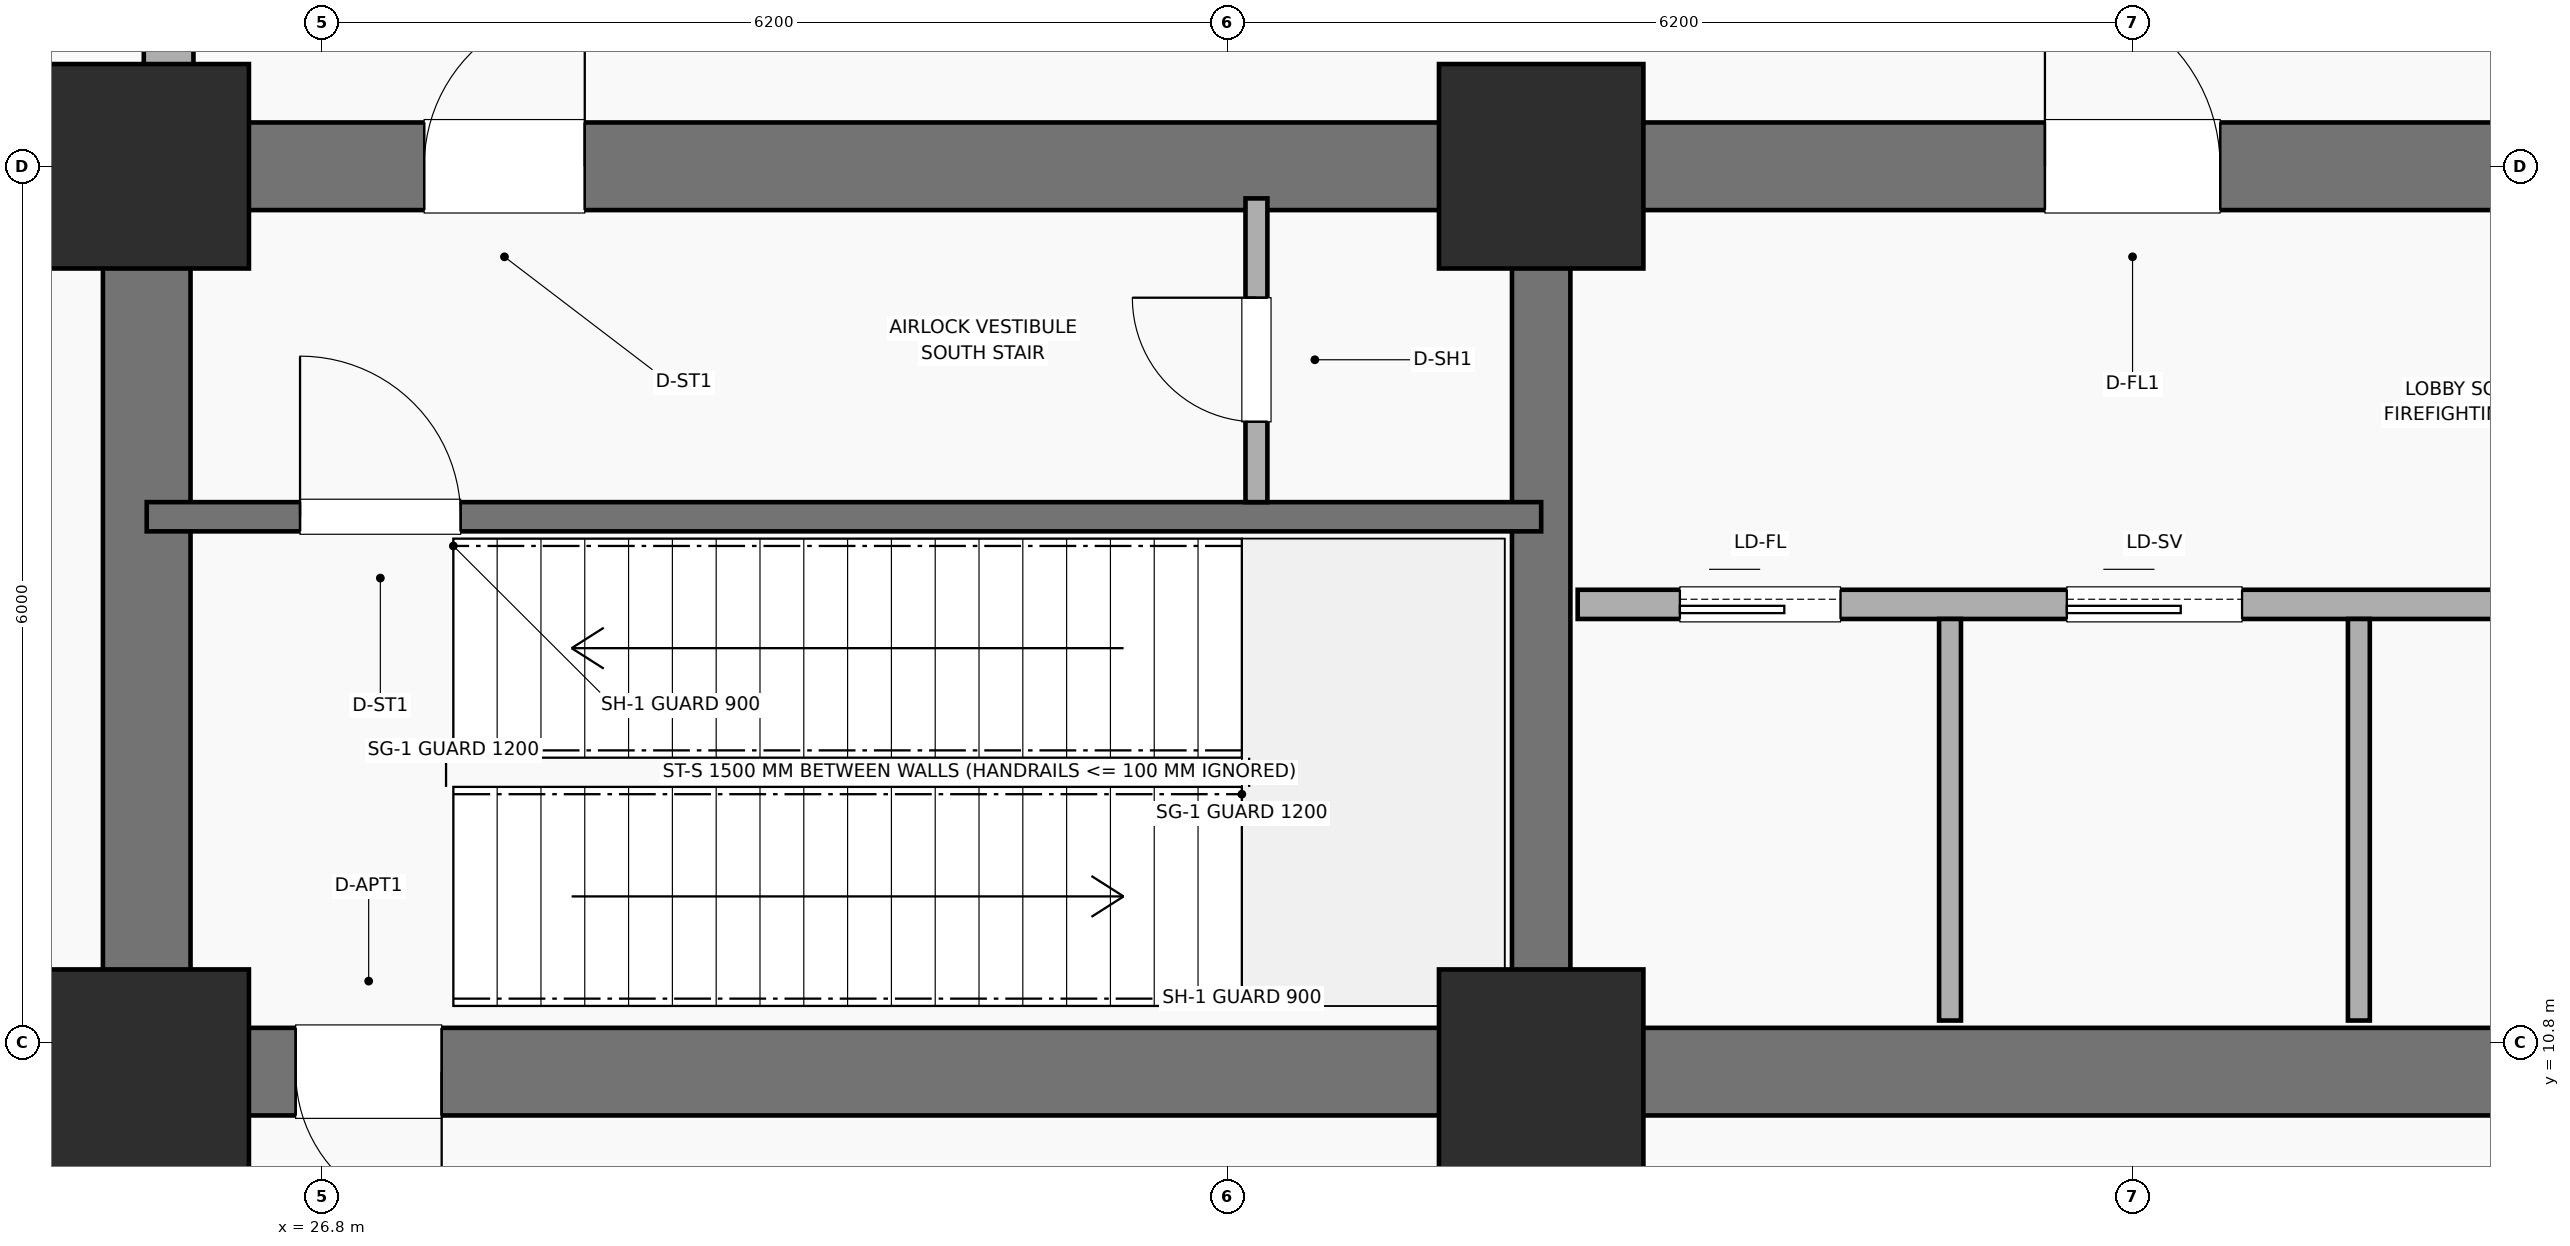
"""IFC4 building model, lengths in metres.
Left out: names, types, materials, properties, quantities, classifications, styles, units other than length and angle.
Written with IfcOpenShell. Run it as: python <this file> out.ifc"""

import sys

from ifc_helpers import new_model, si_unit, direction, frame, frame_2d, origin, origin_2d, place, context, subcontext, project, spatial, rectangle, extrude, element, fill, save


model = new_model("IFC4")
c1 = context("Model", 3, precision=1e-05, world=origin(), true_north=direction((0.0, 1.0)))
c2 = subcontext(c1, "Body", "Model", "MODEL_VIEW")
j1 = project(units=[si_unit("LENGTHUNIT", "METRE"), si_unit("PLANEANGLEUNIT", "RADIAN")], contexts=[c1])
p1 = place(None, origin())
s1 = spatial("IfcSite", under=j1, at=p1, CompositionType="ELEMENT")
p2 = place(p1, origin())
s2 = spatial("IfcBuilding", under=s1, at=p2, CompositionType="ELEMENT")
p3 = place(p2, origin())
s3 = spatial("IfcBuildingStorey", under=s2, at=p3, CompositionType="ELEMENT", Elevation=0.0)
p4 = place(p3, frame((52.8, 10.6, 0.0), z_axis=(0.0, 0.0, 1.0), x_axis=(-1.0, 0.0, 0.0)))
e1 = element("IfcWall", 1, at=p4, inside=s3, PredefinedType="SHEAR", context=c2, shape_type="SweptSolid", body=[
    extrude(rectangle(XDim=27.2, YDim=0.6, at=frame_2d((13.6, 0.0))), origin(), (0.0, 0.0, 1.0), 6.6),
])
p5 = place(p4, frame((25.18, 0.0, 0.0)))
e2 = element("IfcOpeningElement", 2, at=p5, cuts=e1, PredefinedType="OPENING", context=c2, shape_type="SweptSolid", body=[
    extrude(rectangle(XDim=1.0, YDim=2.15, at=frame_2d((0.5, 1.075))), frame((0.0, 0.31, 0.0), z_axis=(0.0, -1.0, 0.0), x_axis=(1.0, 0.0, 0.0)), (0.0, 0.0, 1.0), 0.62),
])
p6 = place(p3, frame((25.6, 10.9, 0.0), z_axis=(0.0, 0.0, 1.0), x_axis=(0.0, 1.0, 0.0)))
e3 = element("IfcWall", 3, at=p6, inside=s3, PredefinedType="SHEAR", context=c2, shape_type="SweptSolid", body=[
    extrude(rectangle(XDim=5.6, YDim=0.6, at=frame_2d((2.8, 0.0))), origin(), (0.0, 0.0, 1.0), 6.6),
])
p7 = place(p3, frame((25.6, 16.8, 0.0), z_axis=(0.0, 0.0, 1.0), x_axis=(1.0, 0.0, 0.0)))
e4 = element("IfcWall", 4, at=p7, inside=s3, PredefinedType="SHEAR", context=c2, shape_type="SweptSolid", body=[
    extrude(rectangle(XDim=27.2, YDim=0.6, at=frame_2d((13.6, 0.0))), origin(), (0.0, 0.0, 1.0), 6.6),
])
p8 = place(p7, frame((1.9, 0.0, 0.0)))
e5 = element("IfcOpeningElement", 5, at=p8, cuts=e4, PredefinedType="OPENING", context=c2, shape_type="SweptSolid", body=[
    extrude(rectangle(XDim=1.1, YDim=2.15, at=frame_2d((0.55, 1.075))), frame((0.0, 0.31, 0.0), z_axis=(0.0, -1.0, 0.0), x_axis=(1.0, 0.0, 0.0)), (0.0, 0.0, 1.0), 0.62),
])
p9 = place(p7, frame((13.0, 0.0, 0.0)))
e6 = element("IfcOpeningElement", 6, at=p9, cuts=e4, PredefinedType="OPENING", context=c2, shape_type="SweptSolid", body=[
    extrude(rectangle(XDim=1.2, YDim=2.15, at=frame_2d((0.6, 1.075))), frame((0.0, 0.31, 0.0), z_axis=(0.0, -1.0, 0.0), x_axis=(1.0, 0.0, 0.0)), (0.0, 0.0, 1.0), 0.62),
])
p10 = place(p7, frame((20.4, 0.0, 0.0)))
e7 = element("IfcOpeningElement", 7, at=p10, cuts=e4, PredefinedType="OPENING", context=c2, shape_type="SweptSolid", body=[
    extrude(rectangle(XDim=1.3, YDim=2.2, at=frame_2d((0.65, 1.1))), frame((0.0, 0.31, 0.0), z_axis=(0.0, -1.0, 0.0), x_axis=(1.0, 0.0, 0.0)), (0.0, 0.0, 1.0), 0.62),
])
p11 = place(p7, frame((24.65, 0.0, 0.0)))
e8 = element("IfcOpeningElement", 8, at=p11, cuts=e4, PredefinedType="OPENING", context=c2, shape_type="SweptSolid", body=[
    extrude(rectangle(XDim=0.85, YDim=2.1, at=frame_2d((0.425, 1.05))), frame((0.0, 0.31, 0.0), z_axis=(0.0, -1.0, 0.0), x_axis=(1.0, 0.0, 0.0)), (0.0, 0.0, 1.0), 0.62),
])
p12 = place(p3, frame((35.15, 10.9, 0.0), z_axis=(0.0, 0.0, 1.0), x_axis=(0.0, 1.0, 0.0)))
e9 = element("IfcWall", 9, at=p12, inside=s3, PredefinedType="SHEAR", context=c2, shape_type="SweptSolid", body=[
    extrude(rectangle(XDim=5.6, YDim=0.4, at=frame_2d((2.8, 0.0))), origin(), (0.0, 0.0, 1.0), 6.6),
])
for number, where, z_axis, x_axis in (
    (10, (25.6, 10.6, 0.0), (0.0, 0.0, 1.0), (1.0, 0.0, 0.0)),
    (11, (25.6, 16.8, 0.0), (0.0, 0.0, 1.0), (1.0, 0.0, 0.0)),
    (12, (35.15, 10.6, 0.0), (0.0, 0.0, 1.0), (1.0, 0.0, 0.0)),
    (13, (35.15, 16.8, 0.0), (0.0, 0.0, 1.0), (1.0, 0.0, 0.0)),
):
    element("IfcColumn", number, at=place(p3, frame(where, z_axis=z_axis, x_axis=x_axis)), inside=s3, PredefinedType="COLUMN", context=c2, shape_type="SweptSolid", body=[
        extrude(rectangle(XDim=1.4, YDim=1.4, at=origin_2d()), origin(), (0.0, 0.0, 1.0), 6.6),
    ])
p13 = place(p3, frame((25.75, 17.15, 0.0), z_axis=(0.0, 0.0, 1.0), x_axis=(0.0, 1.0, 0.0)))
e14 = element("IfcWall", 14, at=p13, inside=s3, PredefinedType="SOLIDWALL", context=c2, shape_type="SweptSolid", body=[
    extrude(rectangle(XDim=3.45, YDim=0.34, at=frame_2d((1.725, 0.0))), origin(), (0.0, 0.0, 1.0), 5.58),
])
p14 = place(p13, frame((0.7, 0.0, 0.0)))
e15 = element("IfcOpeningElement", 15, at=p14, cuts=e14, PredefinedType="OPENING", context=c2, shape_type="SweptSolid", body=[
    extrude(rectangle(XDim=2.0, YDim=2.45, at=frame_2d((1.0, 1.225))), frame((0.0, 0.18, 0.0), z_axis=(0.0, -1.0, 0.0), x_axis=(1.0, 0.0, 0.0)), (0.0, 0.0, 1.0), 0.36),
])
p15 = place(p3, frame((25.6, 14.4, 0.0), z_axis=(0.0, 0.0, 1.0), x_axis=(1.0, 0.0, 0.0)))
e16 = element("IfcWall", 16, at=p15, inside=s3, PredefinedType="SHEAR", context=c2, shape_type="SweptSolid", body=[
    extrude(rectangle(XDim=9.55, YDim=0.2, at=frame_2d((4.775, 0.0))), origin(), (0.0, 0.0, 1.0), 6.6),
])
p16 = place(p15, frame((1.05, 0.0, 0.0)))
e17 = element("IfcOpeningElement", 17, at=p16, cuts=e16, PredefinedType="OPENING", context=c2, shape_type="SweptSolid", body=[
    extrude(rectangle(XDim=1.1, YDim=2.15, at=frame_2d((0.55, 1.075))), frame((0.0, 0.11, 0.0), z_axis=(0.0, -1.0, 0.0), x_axis=(1.0, 0.0, 0.0)), (0.0, 0.0, 1.0), 0.22),
])
p17 = place(p3, frame((33.2, 14.5, 0.0), z_axis=(0.0, 0.0, 1.0), x_axis=(0.0, 1.0, 0.0)))
e18 = element("IfcWall", 18, at=p17, inside=s3, PredefinedType="PARTITIONING", context=c2, shape_type="SweptSolid", body=[
    extrude(rectangle(XDim=2.08, YDim=0.15, at=frame_2d((1.04, 0.0))), origin(), (0.0, 0.0, 1.0), 5.52),
])
p18 = place(p17, frame((0.55, 0.0, 0.0)))
e19 = element("IfcOpeningElement", 19, at=p18, cuts=e18, PredefinedType="OPENING", context=c2, shape_type="SweptSolid", body=[
    extrude(rectangle(XDim=0.85, YDim=2.05, at=frame_2d((0.425, 1.025))), frame((0.0, 0.085, 0.0), z_axis=(0.0, -1.0, 0.0), x_axis=(1.0, 0.0, 0.0)), (0.0, 0.0, 1.0), 0.17),
])
p19 = place(p3, frame((35.4, 13.8, 0.0), z_axis=(0.0, 0.0, 1.0), x_axis=(1.0, 0.0, 0.0)))
e20 = element("IfcWall", 20, at=p19, inside=s3, PredefinedType="PARTITIONING", context=c2, shape_type="SweptSolid", body=[
    extrude(rectangle(XDim=7.6, YDim=0.2, at=frame_2d((3.8, 0.0))), origin(), (0.0, 0.0, 1.0), 5.18),
])
p20 = place(p19, frame((0.7, 0.0, 0.0)))
e21 = element("IfcOpeningElement", 21, at=p20, cuts=e20, PredefinedType="OPENING", context=c2, shape_type="SweptSolid", body=[
    extrude(rectangle(XDim=1.1, YDim=2.15, at=frame_2d((0.55, 1.075))), frame((0.0, 0.11, 0.0), z_axis=(0.0, -1.0, 0.0), x_axis=(1.0, 0.0, 0.0)), (0.0, 0.0, 1.0), 0.22),
])
p21 = place(p19, frame((3.35, 0.0, 0.0)))
e22 = element("IfcOpeningElement", 22, at=p21, cuts=e20, PredefinedType="OPENING", context=c2, shape_type="SweptSolid", body=[
    extrude(rectangle(XDim=1.2, YDim=2.15, at=frame_2d((0.6, 1.075))), frame((0.0, 0.11, 0.0), z_axis=(0.0, -1.0, 0.0), x_axis=(1.0, 0.0, 0.0)), (0.0, 0.0, 1.0), 0.22),
])
for number, where, z_axis, x_axis in (
    (23, (37.95, 10.95, 0.0), (0.0, 0.0, 1.0), (0.0, 1.0, 0.0)),
    (24, (40.75, 10.95, 0.0), (0.0, 0.0, 1.0), (0.0, 1.0, 0.0)),
):
    element("IfcWall", number, at=place(p3, frame(where, z_axis=z_axis, x_axis=x_axis)), inside=s3, PredefinedType="PARTITIONING", context=c2, shape_type="SweptSolid", body=[
        extrude(rectangle(XDim=2.75, YDim=0.15, at=frame_2d((1.375, 0.0))), origin(), (0.0, 0.0, 1.0), 5.52),
    ])
p22 = place(p16, origin())
e25 = element("IfcDoor", 25, at=p22, inside=s3, OperationType="SINGLE_SWING_LEFT", PredefinedType="DOOR", context=c2, shape_type="SweptSolid", body=[
    extrude(rectangle(XDim=1.1, YDim=2.15, at=frame_2d((0.55, 1.075))), frame((0.0, 0.025, 0.0), z_axis=(0.0, -1.0, 0.0), x_axis=(1.0, 0.0, 0.0)), (0.0, 0.0, 1.0), 0.05),
])
fill(e17, e25)
p23 = place(p18, origin())
e26 = element("IfcDoor", 26, at=p23, inside=s3, OperationType="SINGLE_SWING_RIGHT", PredefinedType="TRAPDOOR", context=c2, shape_type="SweptSolid", body=[
    extrude(rectangle(XDim=0.85, YDim=2.05, at=frame_2d((0.425, 1.025))), frame((0.0, 0.025, 0.0), z_axis=(0.0, -1.0, 0.0), x_axis=(1.0, 0.0, 0.0)), (0.0, 0.0, 1.0), 0.05),
])
fill(e19, e26)
p24 = place(p20, origin())
e27 = element("IfcDoor", 27, at=p24, inside=s3, OperationType="SLIDING_TO_LEFT", PredefinedType="DOOR", context=c2, shape_type="SweptSolid", body=[
    extrude(rectangle(XDim=1.1, YDim=2.15, at=frame_2d((0.55, 1.075))), frame((0.0, 0.025, 0.0), z_axis=(0.0, -1.0, 0.0), x_axis=(1.0, 0.0, 0.0)), (0.0, 0.0, 1.0), 0.05),
])
fill(e21, e27)
p25 = place(p21, origin())
e28 = element("IfcDoor", 28, at=p25, inside=s3, OperationType="SLIDING_TO_LEFT", PredefinedType="DOOR", context=c2, shape_type="SweptSolid", body=[
    extrude(rectangle(XDim=1.2, YDim=2.15, at=frame_2d((0.6, 1.075))), frame((0.0, 0.025, 0.0), z_axis=(0.0, -1.0, 0.0), x_axis=(1.0, 0.0, 0.0)), (0.0, 0.0, 1.0), 0.05),
])
fill(e22, e28)
p26 = place(p5, origin())
e29 = element("IfcDoor", 29, at=p26, inside=s3, OperationType="SINGLE_SWING_LEFT", PredefinedType="DOOR", context=c2, shape_type="SweptSolid", body=[
    extrude(rectangle(XDim=1.0, YDim=2.15, at=frame_2d((0.5, 1.075))), frame((0.0, 0.025, 0.0), z_axis=(0.0, -1.0, 0.0), x_axis=(1.0, 0.0, 0.0)), (0.0, 0.0, 1.0), 0.05),
])
fill(e2, e29)
p27 = place(p8, origin())
e30 = element("IfcDoor", 30, at=p27, inside=s3, OperationType="SINGLE_SWING_RIGHT", PredefinedType="DOOR", context=c2, shape_type="SweptSolid", body=[
    extrude(rectangle(XDim=1.1, YDim=2.15, at=frame_2d((0.55, 1.075))), frame((0.0, 0.025, 0.0), z_axis=(0.0, -1.0, 0.0), x_axis=(1.0, 0.0, 0.0)), (0.0, 0.0, 1.0), 0.05),
])
fill(e5, e30)
p28 = place(p9, origin())
e31 = element("IfcDoor", 31, at=p28, inside=s3, OperationType="SINGLE_SWING_LEFT", PredefinedType="DOOR", context=c2, shape_type="SweptSolid", body=[
    extrude(rectangle(XDim=1.2, YDim=2.15, at=frame_2d((0.6, 1.075))), frame((0.0, 0.025, 0.0), z_axis=(0.0, -1.0, 0.0), x_axis=(1.0, 0.0, 0.0)), (0.0, 0.0, 1.0), 0.05),
])
fill(e6, e31)
save(model, sys.argv[1])
